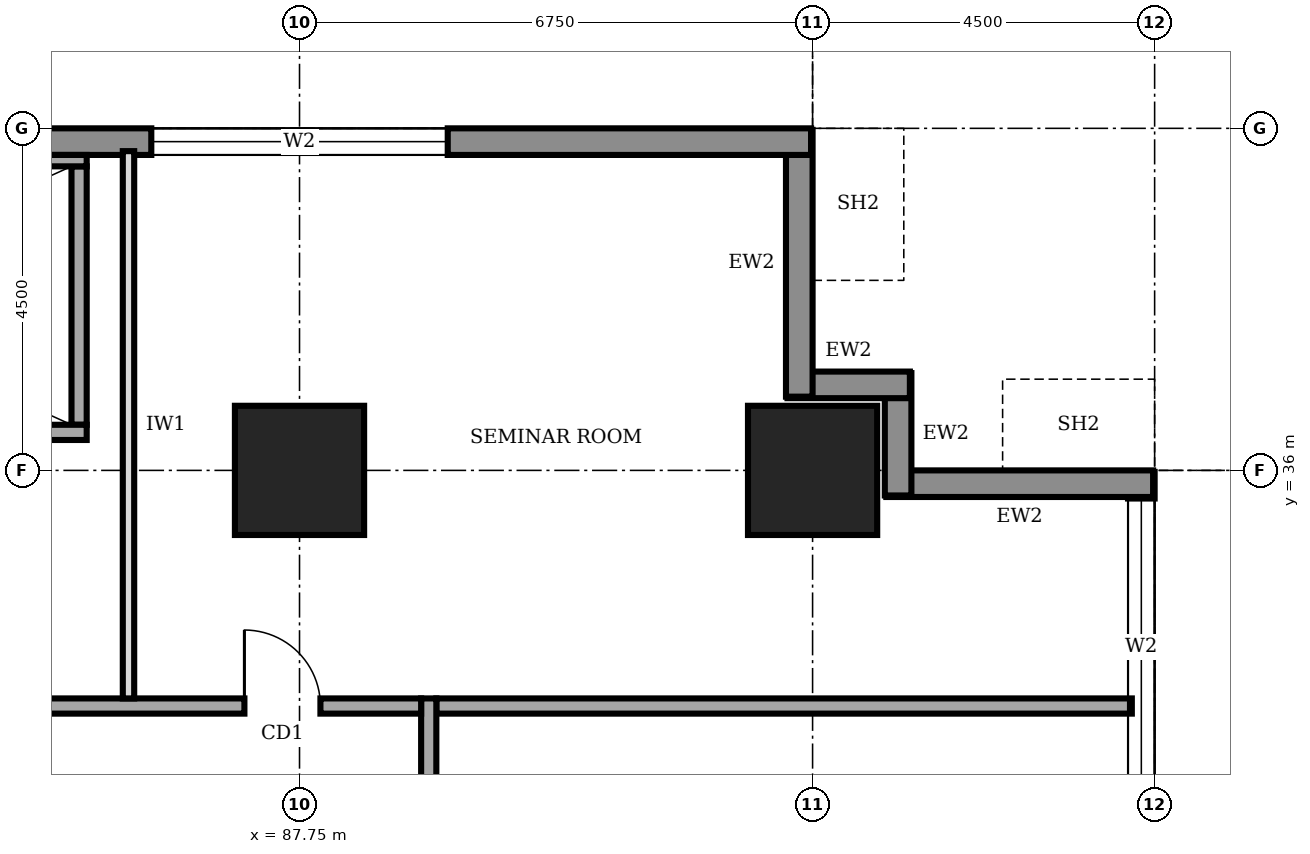
"""IFC4 building model, lengths in metres.
Left out: names, types, materials, properties, quantities, classifications, styles, units other than length and angle.
Written with IfcOpenShell. Run it as: python <this file> out.ifc"""

import sys

from ifc_helpers import new_model, si_unit, direction, frame, frame_2d, origin, origin_2d, place, context, subcontext, project, spatial, rectangle, extrude, element, fill, save


model = new_model("IFC4")
c1 = context("Model", 3, precision=1e-05, world=origin(), true_north=direction((0.0, 1.0)))
c2 = subcontext(c1, "Body", "Model", "MODEL_VIEW")
j1 = project(units=[si_unit("LENGTHUNIT", "METRE"), si_unit("PLANEANGLEUNIT", "RADIAN")], contexts=[c1])
p1 = place(None, origin())
s1 = spatial("IfcSite", under=j1, at=p1, CompositionType="ELEMENT")
p2 = place(p1, origin())
s2 = spatial("IfcBuilding", under=s1, at=p2, CompositionType="ELEMENT")
p3 = place(p2, frame((0.0, 0.0, 65.0)))
s3 = spatial("IfcBuildingStorey", under=s2, at=p3, CompositionType="ELEMENT", Elevation=65.0)
for number, where, z_axis, x_axis in (
    (1, (87.75, 36.0, 0.0), (0.0, 0.0, 1.0), (1.0, 0.0, 0.0)),
    (2, (94.5, 36.0, 0.0), (0.0, 0.0, 1.0), (1.0, 0.0, 0.0)),
):
    element("IfcColumn", number, at=place(p3, frame(where, z_axis=z_axis, x_axis=x_axis)), inside=s3, PredefinedType="COLUMN", context=c2, shape_type="SweptSolid", body=[
        extrude(rectangle(XDim=1.7, YDim=1.7, at=origin_2d()), origin(), (0.0, 0.0, 1.0), 4.0),
    ])
p4 = place(p3, frame((98.825, 4.52, 0.0), z_axis=(0.0, 0.0, 1.0), x_axis=(0.0, 1.0, 0.0)))
e3 = element("IfcWall", 3, at=p4, inside=s3, PredefinedType="STANDARD", context=c2, shape_type="SweptSolid", body=[
    extrude(rectangle(XDim=31.46, YDim=0.35, at=frame_2d((15.73, 0.0))), origin(), (0.0, 0.0, 1.0), 3.75),
])
p5 = place(p4, frame((4.78, 0.0, 0.6)))
e4 = element("IfcOpeningElement", 4, at=p5, cuts=e3, PredefinedType="OPENING", context=c2, shape_type="SweptSolid", body=[
    extrude(rectangle(XDim=3.9, YDim=2.6, at=frame_2d((1.95, 1.3))), frame((0.0, 0.185, 0.0), z_axis=(0.0, -1.0, 0.0), x_axis=(1.0, 0.0, 0.0)), (0.0, 0.0, 1.0), 0.37),
])
p6 = place(p4, frame((9.28, 0.0, 0.6)))
e5 = element("IfcOpeningElement", 5, at=p6, cuts=e3, PredefinedType="OPENING", context=c2, shape_type="SweptSolid", body=[
    extrude(rectangle(XDim=3.9, YDim=2.6, at=frame_2d((1.95, 1.3))), frame((0.0, 0.185, 0.0), z_axis=(0.0, -1.0, 0.0), x_axis=(1.0, 0.0, 0.0)), (0.0, 0.0, 1.0), 0.37),
])
p7 = place(p4, frame((13.78, 0.0, 0.6)))
e6 = element("IfcOpeningElement", 6, at=p7, cuts=e3, PredefinedType="OPENING", context=c2, shape_type="SweptSolid", body=[
    extrude(rectangle(XDim=3.9, YDim=2.6, at=frame_2d((1.95, 1.3))), frame((0.0, 0.185, 0.0), z_axis=(0.0, -1.0, 0.0), x_axis=(1.0, 0.0, 0.0)), (0.0, 0.0, 1.0), 0.37),
])
p8 = place(p4, frame((18.28, 0.0, 0.6)))
e7 = element("IfcOpeningElement", 7, at=p8, cuts=e3, PredefinedType="OPENING", context=c2, shape_type="SweptSolid", body=[
    extrude(rectangle(XDim=3.9, YDim=2.6, at=frame_2d((1.95, 1.3))), frame((0.0, 0.185, 0.0), z_axis=(0.0, -1.0, 0.0), x_axis=(1.0, 0.0, 0.0)), (0.0, 0.0, 1.0), 0.37),
])
p9 = place(p4, frame((22.78, 0.0, 0.6)))
e8 = element("IfcOpeningElement", 8, at=p9, cuts=e3, PredefinedType="OPENING", context=c2, shape_type="SweptSolid", body=[
    extrude(rectangle(XDim=3.9, YDim=2.6, at=frame_2d((1.95, 1.3))), frame((0.0, 0.185, 0.0), z_axis=(0.0, -1.0, 0.0), x_axis=(1.0, 0.0, 0.0)), (0.0, 0.0, 1.0), 0.37),
])
p10 = place(p4, frame((27.21, 0.0, 0.6)))
e9 = element("IfcOpeningElement", 9, at=p10, cuts=e3, PredefinedType="OPENING", context=c2, shape_type="SweptSolid", body=[
    extrude(rectangle(XDim=3.9, YDim=2.6, at=frame_2d((1.95, 1.3))), frame((0.0, 0.185, 0.0), z_axis=(0.0, -1.0, 0.0), x_axis=(1.0, 0.0, 0.0)), (0.0, 0.0, 1.0), 0.37),
])
p11 = place(p3, frame((98.98, 35.825, 0.0), z_axis=(0.0, 0.0, 1.0), x_axis=(-1.0, 0.0, 0.0)))
e10 = element("IfcWall", 10, at=p11, inside=s3, PredefinedType="STANDARD", context=c2, shape_type="SweptSolid", body=[
    extrude(rectangle(XDim=3.51, YDim=0.35, at=frame_2d((1.755, 0.0))), origin(), (0.0, 0.0, 1.0), 2.85),
])
for number, where, z_axis, x_axis in (
    (11, (95.625, 35.67, 0.0), (0.0, 0.0, 1.0), (0.0, 1.0, 0.0)),
    (12, (95.78, 37.125, 0.0), (0.0, 0.0, 1.0), (-1.0, 0.0, 0.0)),
):
    element("IfcWall", number, at=place(p3, frame(where, z_axis=z_axis, x_axis=x_axis)), inside=s3, PredefinedType="STANDARD", context=c2, shape_type="SweptSolid", body=[
        extrude(rectangle(XDim=1.61, YDim=0.35, at=frame_2d((0.805, 0.0))), origin(), (0.0, 0.0, 1.0), 3.75),
    ])
p12 = place(p3, frame((94.325, 36.97, 0.0), z_axis=(0.0, 0.0, 1.0), x_axis=(0.0, 1.0, 0.0)))
e13 = element("IfcWall", 13, at=p12, inside=s3, PredefinedType="STANDARD", context=c2, shape_type="SweptSolid", body=[
    extrude(rectangle(XDim=3.51, YDim=0.35, at=frame_2d((1.755, 0.0))), origin(), (0.0, 0.0, 1.0), 2.85),
])
p13 = place(p3, frame((94.48, 40.325, 0.0), z_axis=(0.0, 0.0, 1.0), x_axis=(-1.0, 0.0, 0.0)))
e14 = element("IfcWall", 14, at=p13, inside=s3, PredefinedType="STANDARD", context=c2, shape_type="SweptSolid", body=[
    extrude(rectangle(XDim=26.96, YDim=0.35, at=frame_2d((13.48, 0.0))), origin(), (0.0, 0.0, 1.0), 3.75),
])
p14 = place(p13, frame((22.71, 0.0, 0.6)))
e15 = element("IfcOpeningElement", 15, at=p14, cuts=e14, PredefinedType="OPENING", context=c2, shape_type="SweptSolid", body=[
    extrude(rectangle(XDim=3.9, YDim=2.6, at=frame_2d((1.95, 1.3))), frame((0.0, 0.185, 0.0), z_axis=(0.0, -1.0, 0.0), x_axis=(1.0, 0.0, 0.0)), (0.0, 0.0, 1.0), 0.37),
])
p15 = place(p13, frame((18.28, 0.0, 0.6)))
e16 = element("IfcOpeningElement", 16, at=p15, cuts=e14, PredefinedType="OPENING", context=c2, shape_type="SweptSolid", body=[
    extrude(rectangle(XDim=3.9, YDim=2.6, at=frame_2d((1.95, 1.3))), frame((0.0, 0.185, 0.0), z_axis=(0.0, -1.0, 0.0), x_axis=(1.0, 0.0, 0.0)), (0.0, 0.0, 1.0), 0.37),
])
p16 = place(p13, frame((4.78, 0.0, 0.6)))
e17 = element("IfcOpeningElement", 17, at=p16, cuts=e14, PredefinedType="OPENING", context=c2, shape_type="SweptSolid", body=[
    extrude(rectangle(XDim=3.9, YDim=2.6, at=frame_2d((1.95, 1.3))), frame((0.0, 0.185, 0.0), z_axis=(0.0, -1.0, 0.0), x_axis=(1.0, 0.0, 0.0)), (0.0, 0.0, 1.0), 0.37),
])
p17 = place(p3, frame((89.45, 7.7, 0.0), z_axis=(0.0, 0.0, 1.0), x_axis=(0.0, 1.0, 0.0)))
e18 = element("IfcWall", 18, at=p17, inside=s3, PredefinedType="SOLIDWALL", context=c2, shape_type="SweptSolid", body=[
    extrude(rectangle(XDim=25.3, YDim=0.2, at=frame_2d((12.65, 0.0))), origin(), (0.0, 0.0, 1.0), 3.75),
])
p18 = place(p17, frame((2.3, 0.0, 0.0)))
e19 = element("IfcOpeningElement", 19, at=p18, cuts=e18, PredefinedType="OPENING", context=c2, shape_type="SweptSolid", body=[
    extrude(rectangle(XDim=1.0, YDim=2.1, at=frame_2d((0.5, 1.05))), frame((0.0, 0.11, 0.0), z_axis=(0.0, -1.0, 0.0), x_axis=(1.0, 0.0, 0.0)), (0.0, 0.0, 1.0), 0.22),
])
p19 = place(p17, frame((6.55, 0.0, 0.0)))
e20 = element("IfcOpeningElement", 20, at=p19, cuts=e18, PredefinedType="OPENING", context=c2, shape_type="SweptSolid", body=[
    extrude(rectangle(XDim=0.9, YDim=2.1, at=frame_2d((0.45, 1.05))), frame((0.0, 0.11, 0.0), z_axis=(0.0, -1.0, 0.0), x_axis=(1.0, 0.0, 0.0)), (0.0, 0.0, 1.0), 0.22),
])
p20 = place(p17, frame((9.75, 0.0, 0.0)))
e21 = element("IfcOpeningElement", 21, at=p20, cuts=e18, PredefinedType="OPENING", context=c2, shape_type="SweptSolid", body=[
    extrude(rectangle(XDim=0.9, YDim=2.1, at=frame_2d((0.45, 1.05))), frame((0.0, 0.11, 0.0), z_axis=(0.0, -1.0, 0.0), x_axis=(1.0, 0.0, 0.0)), (0.0, 0.0, 1.0), 0.22),
])
p21 = place(p17, frame((15.3, 0.0, 0.0)))
e22 = element("IfcOpeningElement", 22, at=p21, cuts=e18, PredefinedType="OPENING", context=c2, shape_type="SweptSolid", body=[
    extrude(rectangle(XDim=0.9, YDim=2.1, at=frame_2d((0.45, 1.05))), frame((0.0, 0.11, 0.0), z_axis=(0.0, -1.0, 0.0), x_axis=(1.0, 0.0, 0.0)), (0.0, 0.0, 1.0), 0.22),
])
p22 = place(p17, frame((17.8, 0.0, 0.0)))
e23 = element("IfcOpeningElement", 23, at=p22, cuts=e18, PredefinedType="OPENING", context=c2, shape_type="SweptSolid", body=[
    extrude(rectangle(XDim=1.0, YDim=2.1, at=frame_2d((0.5, 1.05))), frame((0.0, 0.11, 0.0), z_axis=(0.0, -1.0, 0.0), x_axis=(1.0, 0.0, 0.0)), (0.0, 0.0, 1.0), 0.22),
])
p23 = place(p17, frame((12.7, 0.0, 0.0)))
e24 = element("IfcOpeningElement", 24, at=p23, cuts=e18, PredefinedType="OPENING", context=c2, shape_type="SweptSolid", body=[
    extrude(rectangle(XDim=1.0, YDim=2.1, at=frame_2d((0.5, 1.05))), frame((0.0, 0.11, 0.0), z_axis=(0.0, -1.0, 0.0), x_axis=(1.0, 0.0, 0.0)), (0.0, 0.0, 1.0), 0.22),
])
p24 = place(p17, frame((21.8, 0.0, 0.0)))
e25 = element("IfcOpeningElement", 25, at=p24, cuts=e18, PredefinedType="OPENING", context=c2, shape_type="SweptSolid", body=[
    extrude(rectangle(XDim=1.0, YDim=2.1, at=frame_2d((0.5, 1.05))), frame((0.0, 0.11, 0.0), z_axis=(0.0, -1.0, 0.0), x_axis=(1.0, 0.0, 0.0)), (0.0, 0.0, 1.0), 0.22),
])
p25 = place(p3, frame((89.35, 32.9, 0.0), z_axis=(0.0, 0.0, 1.0), x_axis=(-1.0, 0.0, 0.0)))
e26 = element("IfcWall", 26, at=p25, inside=s3, PredefinedType="SOLIDWALL", context=c2, shape_type="SweptSolid", body=[
    extrude(rectangle(XDim=16.9, YDim=0.2, at=frame_2d((8.45, 0.0))), origin(), (0.0, 0.0, 1.0), 3.75),
])
p26 = place(p25, frame((14.375, 0.0, 0.0)))
e27 = element("IfcOpeningElement", 27, at=p26, cuts=e26, PredefinedType="OPENING", context=c2, shape_type="SweptSolid", body=[
    extrude(rectangle(XDim=1.0, YDim=2.1, at=frame_2d((0.5, 1.05))), frame((0.0, 0.11, 0.0), z_axis=(0.0, -1.0, 0.0), x_axis=(1.0, 0.0, 0.0)), (0.0, 0.0, 1.0), 0.22),
])
p27 = place(p25, frame((7.85, 0.0, 0.0)))
e28 = element("IfcOpeningElement", 28, at=p27, cuts=e26, PredefinedType="OPENING", context=c2, shape_type="SweptSolid", body=[
    extrude(rectangle(XDim=1.0, YDim=2.1, at=frame_2d((0.5, 1.05))), frame((0.0, 0.11, 0.0), z_axis=(0.0, -1.0, 0.0), x_axis=(1.0, 0.0, 0.0)), (0.0, 0.0, 1.0), 0.22),
])
p28 = place(p25, frame((1.325, 0.0, 0.0)))
e29 = element("IfcOpeningElement", 29, at=p28, cuts=e26, PredefinedType="OPENING", context=c2, shape_type="SweptSolid", body=[
    extrude(rectangle(XDim=1.0, YDim=2.1, at=frame_2d((0.5, 1.05))), frame((0.0, 0.11, 0.0), z_axis=(0.0, -1.0, 0.0), x_axis=(1.0, 0.0, 0.0)), (0.0, 0.0, 1.0), 0.22),
])
p29 = place(p3, frame((89.55, 32.9, 0.0), z_axis=(0.0, 0.0, 1.0), x_axis=(1.0, 0.0, 0.0)))
e30 = element("IfcWall", 30, at=p29, inside=s3, PredefinedType="SOLIDWALL", context=c2, shape_type="SweptSolid", body=[
    extrude(rectangle(XDim=9.15, YDim=0.2, at=frame_2d((4.575, 0.0))), origin(), (0.0, 0.0, 1.0), 3.75),
])
p30 = place(p3, frame((85.5, 33.0, 0.0), z_axis=(0.0, 0.0, 1.0), x_axis=(0.0, 1.0, 0.0)))
e31 = element("IfcWall", 31, at=p30, inside=s3, PredefinedType="PARTITIONING", context=c2, shape_type="SweptSolid", body=[
    extrude(rectangle(XDim=7.2, YDim=0.15, at=frame_2d((3.6, 0.0))), origin(), (0.0, 0.0, 1.0), 3.75),
])
p31 = place(p3, frame((77.05, 36.5, 0.0), z_axis=(0.0, 0.0, 1.0), x_axis=(1.0, 0.0, 0.0)))
e32 = element("IfcWall", 32, at=p31, inside=s3, PredefinedType="SOLIDWALL", context=c2, shape_type="SweptSolid", body=[
    extrude(rectangle(XDim=7.9, YDim=0.2, at=frame_2d((3.95, 0.0))), origin(), (0.0, 0.0, 1.0), 3.75),
])
p32 = place(p31, frame((6.3, 0.0, 0.0)))
e33 = element("IfcOpeningElement", 33, at=p32, cuts=e32, PredefinedType="OPENING", context=c2, shape_type="SweptSolid", body=[
    extrude(rectangle(XDim=1.0, YDim=2.1, at=frame_2d((0.5, 1.05))), frame((0.0, 0.11, 0.0), z_axis=(0.0, -1.0, 0.0), x_axis=(1.0, 0.0, 0.0)), (0.0, 0.0, 1.0), 0.22),
])
p33 = place(p3, frame((77.05, 40.075, 0.0), z_axis=(0.0, 0.0, 1.0), x_axis=(1.0, 0.0, 0.0)))
e34 = element("IfcWall", 34, at=p33, inside=s3, PredefinedType="SOLIDWALL", context=c2, shape_type="SweptSolid", body=[
    extrude(rectangle(XDim=7.9, YDim=0.15, at=frame_2d((3.95, 0.0))), origin(), (0.0, 0.0, 1.0), 3.75),
])
p34 = place(p3, frame((84.85, 36.6, 0.0), z_axis=(0.0, 0.0, 1.0), x_axis=(0.0, 1.0, 0.0)))
e35 = element("IfcWall", 35, at=p34, inside=s3, PredefinedType="SOLIDWALL", context=c2, shape_type="SweptSolid", body=[
    extrude(rectangle(XDim=3.4, YDim=0.2, at=frame_2d((1.7, 0.0))), origin(), (0.0, 0.0, 1.0), 3.75),
])
p35 = place(p10, origin())
e36 = element("IfcWindow", 36, at=p35, inside=s3, PartitioningType="SINGLE_PANEL", PredefinedType="WINDOW", context=c2, shape_type="SweptSolid", body=[
    extrude(rectangle(XDim=3.9, YDim=2.6, at=frame_2d((1.95, 1.3))), frame((0.0, 0.03, 0.0), z_axis=(0.0, -1.0, 0.0), x_axis=(1.0, 0.0, 0.0)), (0.0, 0.0, 1.0), 0.06),
])
fill(e9, e36)
p36 = place(p16, origin())
e37 = element("IfcWindow", 37, at=p36, inside=s3, PartitioningType="SINGLE_PANEL", PredefinedType="WINDOW", context=c2, shape_type="SweptSolid", body=[
    extrude(rectangle(XDim=3.9, YDim=2.6, at=frame_2d((1.95, 1.3))), frame((0.0, 0.03, 0.0), z_axis=(0.0, -1.0, 0.0), x_axis=(1.0, 0.0, 0.0)), (0.0, 0.0, 1.0), 0.06),
])
fill(e17, e37)
p37 = place(p28, frame((1.0, 0.0, 0.0), z_axis=(0.0, 0.0, 1.0), x_axis=(-1.0, 0.0, 0.0)))
e38 = element("IfcDoor", 38, at=p37, inside=s3, OperationType="SINGLE_SWING_LEFT", PredefinedType="DOOR", context=c2, shape_type="SweptSolid", body=[
    extrude(rectangle(XDim=1.0, YDim=2.1, at=frame_2d((0.5, 1.05))), frame((0.0, 0.025, 0.0), z_axis=(0.0, -1.0, 0.0), x_axis=(1.0, 0.0, 0.0)), (0.0, 0.0, 1.0), 0.05),
])
fill(e29, e38)
save(model, sys.argv[1])
